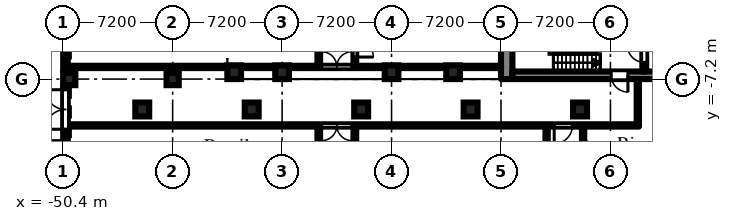
"""IFC4 building model, lengths in metres.
Left out: names, types, materials, properties, quantities, classifications, styles, units other than length and angle.
Written with IfcOpenShell. Run it as: python <this file> out.ifc"""

import sys

from ifc_helpers import new_model, si_unit, direction, frame, frame_2d, origin, origin_2d, place, context, subcontext, project, spatial, rectangle, hollow_circle, extrude, element, fill, save


model = new_model("IFC4")
c1 = context("Model", 3, precision=1e-05, world=origin(), true_north=direction((0.0, 1.0)))
c2 = subcontext(c1, "Body", "Model", "MODEL_VIEW")
j1 = project(units=[si_unit("LENGTHUNIT", "METRE"), si_unit("PLANEANGLEUNIT", "RADIAN")], contexts=[c1])
p1 = place(None, origin())
s1 = spatial("IfcSite", under=j1, at=p1, CompositionType="ELEMENT")
p2 = place(p1, origin())
s2 = spatial("IfcBuilding", under=s1, at=p2, CompositionType="ELEMENT")
p3 = place(p2, origin())
s3 = spatial("IfcBuildingStorey", under=s2, at=p3, CompositionType="ELEMENT", Elevation=0.0)
for number, where, z_axis, x_axis in (
    (1, (-39.15, -6.75, 0.0), (0.0, 0.0, 1.0), (1.0, 0.0, 0.0)),
    (2, (-36.0, -6.75, 0.0), (0.0, 0.0, 1.0), (1.0, 0.0, 0.0)),
    (3, (-28.8, -6.75, 0.0), (0.0, 0.0, 1.0), (1.0, 0.0, 0.0)),
    (4, (-24.75, -6.75, 0.0), (0.0, 0.0, 1.0), (1.0, 0.0, 0.0)),
):
    element("IfcColumn", number, at=place(p3, frame(where, z_axis=z_axis, x_axis=x_axis)), inside=s3, PredefinedType="COLUMN", context=c2, shape_type="SweptSolid", body=[
        extrude(rectangle(XDim=0.9, YDim=0.9, at=origin_2d()), origin(), (0.0, 0.0, 1.0), 7.2),
    ])
for number, where, z_axis, x_axis in (
    (5, (-50.0, -7.2, 0.0), (0.0, 0.0, 1.0), (1.0, 0.0, 0.0)),
    (6, (-43.2, -7.2, 0.0), (0.0, 0.0, 1.0), (1.0, 0.0, 0.0)),
):
    element("IfcColumn", number, at=place(p3, frame(where, z_axis=z_axis, x_axis=x_axis)), inside=s3, PredefinedType="COLUMN", context=c2, shape_type="SweptSolid", body=[
        extrude(rectangle(XDim=0.8, YDim=0.8, at=origin_2d()), origin(), (0.0, 0.0, 1.0), 6.6),
    ])
for number, where, z_axis, x_axis in (
    (7, (-45.2, -9.2, 0.0), (0.0, 0.0, 1.0), (1.0, 0.0, 0.0)),
    (8, (-38.0, -9.2, 0.0), (0.0, 0.0, 1.0), (1.0, 0.0, 0.0)),
    (9, (-30.8, -9.2, 0.0), (0.0, 0.0, 1.0), (1.0, 0.0, 0.0)),
    (10, (-23.6, -9.2, 0.0), (0.0, 0.0, 1.0), (1.0, 0.0, 0.0)),
    (11, (-16.4, -9.2, 0.0), (0.0, 0.0, 1.0), (1.0, 0.0, 0.0)),
):
    element("IfcColumn", number, at=place(p3, frame(where, z_axis=z_axis, x_axis=x_axis)), inside=s3, PredefinedType="COLUMN", context=c2, shape_type="SweptSolid", body=[
        extrude(hollow_circle(Radius=0.457, WallThickness=0.05, at=origin_2d()), origin(), (0.0, 0.0, 1.0), 7.5),
    ])
p4 = place(p3, frame((-50.25, -0.4, 0.0), z_axis=(0.0, 0.0, 1.0), x_axis=(0.0, -1.0, 0.0)))
e12 = element("IfcWall", 12, at=p4, inside=s3, PredefinedType="SOLIDWALL", context=c2, shape_type="SweptSolid", body=[
    extrude(rectangle(XDim=6.4, YDim=0.3, at=frame_2d((3.2, 0.0))), origin(), (0.0, 0.0, 1.0), 6.6),
])
p5 = place(p4, frame((1.65, 0.0, 0.0)))
e13 = element("IfcOpeningElement", 13, at=p5, cuts=e12, PredefinedType="OPENING", context=c2, shape_type="SweptSolid", body=[
    extrude(rectangle(XDim=1.3, YDim=2.1, at=frame_2d((0.65, 1.05))), frame((0.0, 0.16, 0.0), z_axis=(0.0, -1.0, 0.0), x_axis=(1.0, 0.0, 0.0)), (0.0, 0.0, 1.0), 0.32),
])
p6 = place(p3, frame((-50.25, -7.6, 0.0), z_axis=(0.0, 0.0, 1.0), x_axis=(0.0, -1.0, 0.0)))
e14 = element("IfcWall", 14, at=p6, inside=s3, PredefinedType="SOLIDWALL", context=c2, shape_type="SweptSolid", body=[
    extrude(rectangle(XDim=6.4, YDim=0.3, at=frame_2d((3.2, 0.0))), origin(), (0.0, 0.0, 1.0), 6.6),
])
p7 = place(p6, frame((0.3, 0.0, 0.0)))
e15 = element("IfcOpeningElement", 15, at=p7, cuts=e14, PredefinedType="OPENING", context=c2, shape_type="SweptSolid", body=[
    extrude(rectangle(XDim=2.6, YDim=2.4, at=frame_2d((1.3, 1.2))), frame((0.0, 0.16, 0.0), z_axis=(0.0, -1.0, 0.0), x_axis=(1.0, 0.0, 0.0)), (0.0, 0.0, 1.0), 0.32),
])
p8 = place(p6, frame((3.65, 0.0, 0.0)))
e16 = element("IfcOpeningElement", 16, at=p8, cuts=e14, PredefinedType="OPENING", context=c2, shape_type="SweptSolid", body=[
    extrude(rectangle(XDim=2.6, YDim=2.4, at=frame_2d((1.3, 1.2))), frame((0.0, 0.16, 0.0), z_axis=(0.0, -1.0, 0.0), x_axis=(1.0, 0.0, 0.0)), (0.0, 0.0, 1.0), 0.32),
])
p9 = place(p3, frame((-21.225, -7.2, 0.0), z_axis=(0.0, 0.0, 1.0), x_axis=(0.0, 1.0, 0.0)))
e17 = element("IfcWall", 17, at=p9, inside=s3, PredefinedType="SHEAR", context=c2, shape_type="SweptSolid", body=[
    extrude(rectangle(XDim=14.4, YDim=0.75, at=frame_2d((7.2, 0.0))), origin(), (0.0, 0.0, 1.0), 6.6),
])
p10 = place(p9, frame((6.0, 0.0, 0.0)))
e18 = element("IfcOpeningElement", 18, at=p10, cuts=e17, PredefinedType="OPENING", context=c2, shape_type="SweptSolid", body=[
    extrude(rectangle(XDim=2.4, YDim=2.2, at=frame_2d((1.2, 1.1))), frame((0.0, 0.385, 0.0), z_axis=(0.0, -1.0, 0.0), x_axis=(1.0, 0.0, 0.0)), (0.0, 0.0, 1.0), 0.77),
])
p11 = place(p3, frame((-7.9, -6.95, 0.0), z_axis=(0.0, 0.0, 1.0), x_axis=(-1.0, 0.0, 0.0)))
e19 = element("IfcWall", 19, at=p11, inside=s3, PredefinedType="SHEAR", context=c2, shape_type="SweptSolid", body=[
    extrude(rectangle(XDim=12.95, YDim=0.5, at=frame_2d((6.475, 0.0))), origin(), (0.0, 0.0, 1.0), 6.6),
])
p12 = place(p11, frame((5.35, 0.0, 0.0)))
e20 = element("IfcOpeningElement", 20, at=p12, cuts=e19, PredefinedType="OPENING", context=c2, shape_type="SweptSolid", body=[
    extrude(rectangle(XDim=1.1, YDim=2.1, at=frame_2d((0.55, 1.05))), frame((0.0, 0.26, 0.0), z_axis=(0.0, -1.0, 0.0), x_axis=(1.0, 0.0, 0.0)), (0.0, 0.0, 1.0), 0.52),
])
p13 = place(p3, frame((-12.175, -2.05, 0.0), z_axis=(0.0, 0.0, 1.0), x_axis=(0.0, -1.0, 0.0)))
e21 = element("IfcWall", 21, at=p13, inside=s3, PredefinedType="SHEAR", context=c2, shape_type="SweptSolid", body=[
    extrude(rectangle(XDim=4.65, YDim=0.25, at=frame_2d((2.325, 0.0))), origin(), (0.0, 0.0, 1.0), 6.6),
])
p14 = place(p13, frame((2.95, 0.0, 0.0)))
e22 = element("IfcOpeningElement", 22, at=p14, cuts=e21, PredefinedType="OPENING", context=c2, shape_type="SweptSolid", body=[
    extrude(rectangle(XDim=1.1, YDim=2.1, at=frame_2d((0.55, 1.05))), frame((0.0, 0.135, 0.0), z_axis=(0.0, -1.0, 0.0), x_axis=(1.0, 0.0, 0.0)), (0.0, 0.0, 1.0), 0.27),
])
p15 = place(p3, frame((-50.22, -10.25, 0.0), z_axis=(0.0, 0.0, 1.0), x_axis=(1.0, 0.0, 0.0)))
e23 = element("IfcWall", 23, at=p15, inside=s3, PredefinedType="PARTITIONING", context=c2, shape_type="SweptSolid", body=[
    extrude(rectangle(XDim=37.695, YDim=0.15, at=frame_2d((18.848, 0.0))), origin(), (0.0, 0.0, 1.0), 6.6),
])
p16 = place(p15, frame((16.82, 0.0, 0.0)))
e24 = element("IfcOpeningElement", 24, at=p16, cuts=e23, PredefinedType="OPENING", context=c2, shape_type="SweptSolid", body=[
    extrude(rectangle(XDim=2.0, YDim=2.1, at=frame_2d((1.0, 1.05))), frame((0.0, 0.085, 0.0), z_axis=(0.0, -1.0, 0.0), x_axis=(1.0, 0.0, 0.0)), (0.0, 0.0, 1.0), 0.17),
])
p17 = place(p15, frame((32.12, 0.0, 0.0)))
e25 = element("IfcOpeningElement", 25, at=p17, cuts=e23, PredefinedType="OPENING", context=c2, shape_type="SweptSolid", body=[
    extrude(rectangle(XDim=1.2, YDim=2.1, at=frame_2d((0.6, 1.05))), frame((0.0, 0.085, 0.0), z_axis=(0.0, -1.0, 0.0), x_axis=(1.0, 0.0, 0.0)), (0.0, 0.0, 1.0), 0.17),
])
p18 = place(p3, frame((-50.22, -6.4, 0.0), z_axis=(0.0, 0.0, 1.0), x_axis=(1.0, 0.0, 0.0)))
e26 = element("IfcWall", 26, at=p18, inside=s3, PredefinedType="PARTITIONING", context=c2, shape_type="SweptSolid", body=[
    extrude(rectangle(XDim=28.62, YDim=0.15, at=frame_2d((14.31, 0.0))), origin(), (0.0, 0.0, 1.0), 6.6),
])
p19 = place(p18, frame((16.82, 0.0, 0.0)))
e27 = element("IfcOpeningElement", 27, at=p19, cuts=e26, PredefinedType="OPENING", context=c2, shape_type="SweptSolid", body=[
    extrude(rectangle(XDim=2.0, YDim=2.1, at=frame_2d((1.0, 1.05))), frame((0.0, 0.085, 0.0), z_axis=(0.0, -1.0, 0.0), x_axis=(1.0, 0.0, 0.0)), (0.0, 0.0, 1.0), 0.17),
])
p20 = place(p3, frame((-33.6, -31.275, 0.0), z_axis=(0.0, 0.0, 1.0), x_axis=(0.0, 1.0, 0.0)))
e28 = element("IfcWall", 28, at=p20, inside=s3, PredefinedType="PARTITIONING", context=c2, shape_type="SweptSolid", body=[
    extrude(rectangle(XDim=20.95, YDim=0.15, at=frame_2d((10.475, 0.0))), origin(), (0.0, 0.0, 1.0), 6.6),
])
p21 = place(p20, frame((17.975, 0.0, 0.0)))
e29 = element("IfcOpeningElement", 29, at=p21, cuts=e28, PredefinedType="OPENING", context=c2, shape_type="SweptSolid", body=[
    extrude(rectangle(XDim=1.8, YDim=2.1, at=frame_2d((0.9, 1.05))), frame((0.0, 0.085, 0.0), z_axis=(0.0, -1.0, 0.0), x_axis=(1.0, 0.0, 0.0)), (0.0, 0.0, 1.0), 0.17),
])
p22 = place(p20, frame((0.725, 0.0, 0.0)))
e30 = element("IfcOpeningElement", 30, at=p22, cuts=e28, PredefinedType="OPENING", context=c2, shape_type="SweptSolid", body=[
    extrude(rectangle(XDim=1.8, YDim=2.1, at=frame_2d((0.9, 1.05))), frame((0.0, 0.085, 0.0), z_axis=(0.0, -1.0, 0.0), x_axis=(1.0, 0.0, 0.0)), (0.0, 0.0, 1.0), 0.17),
])
p23 = place(p20, frame((11.825, 0.0, 0.0)))
e31 = element("IfcOpeningElement", 31, at=p23, cuts=e28, PredefinedType="OPENING", context=c2, shape_type="SweptSolid", body=[
    extrude(rectangle(XDim=1.8, YDim=2.1, at=frame_2d((0.9, 1.05))), frame((0.0, 0.085, 0.0), z_axis=(0.0, -1.0, 0.0), x_axis=(1.0, 0.0, 0.0)), (0.0, 0.0, 1.0), 0.17),
])
p24 = place(p3, frame((-33.6, -6.325, 0.0), z_axis=(0.0, 0.0, 1.0), x_axis=(0.0, 1.0, 0.0)))
e32 = element("IfcWall", 32, at=p24, inside=s3, PredefinedType="PARTITIONING", context=c2, shape_type="SweptSolid", body=[
    extrude(rectangle(XDim=4.825, YDim=0.15, at=frame_2d((2.413, 0.0))), origin(), (0.0, 0.0, 1.0), 6.6),
])
p25 = place(p24, frame((2.375, 0.0, 0.0)))
e33 = element("IfcOpeningElement", 33, at=p25, cuts=e32, PredefinedType="OPENING", context=c2, shape_type="SweptSolid", body=[
    extrude(rectangle(XDim=1.8, YDim=2.1, at=frame_2d((0.9, 1.05))), frame((0.0, 0.085, 0.0), z_axis=(0.0, -1.0, 0.0), x_axis=(1.0, 0.0, 0.0)), (0.0, 0.0, 1.0), 0.17),
])
p26 = place(p3, frame((-31.2, -16.875, 0.0), z_axis=(0.0, 0.0, 1.0), x_axis=(0.0, 1.0, 0.0)))
e34 = element("IfcWall", 34, at=p26, inside=s3, PredefinedType="PARTITIONING", context=c2, shape_type="SweptSolid", body=[
    extrude(rectangle(XDim=6.55, YDim=0.15, at=frame_2d((3.275, 0.0))), origin(), (0.0, 0.0, 1.0), 6.6),
])
p27 = place(p26, frame((1.325, 0.0, 0.0)))
e35 = element("IfcOpeningElement", 35, at=p27, cuts=e34, PredefinedType="OPENING", context=c2, shape_type="SweptSolid", body=[
    extrude(rectangle(XDim=1.8, YDim=2.1, at=frame_2d((0.9, 1.05))), frame((0.0, 0.085, 0.0), z_axis=(0.0, -1.0, 0.0), x_axis=(1.0, 0.0, 0.0)), (0.0, 0.0, 1.0), 0.17),
])
p28 = place(p3, frame((-31.2, -6.325, 0.0), z_axis=(0.0, 0.0, 1.0), x_axis=(0.0, 1.0, 0.0)))
e36 = element("IfcWall", 36, at=p28, inside=s3, PredefinedType="PARTITIONING", context=c2, shape_type="SweptSolid", body=[
    extrude(rectangle(XDim=12.65, YDim=0.15, at=frame_2d((6.325, 0.0))), origin(), (0.0, 0.0, 1.0), 6.6),
])
p29 = place(p28, frame((5.325, 0.0, 0.0)))
e37 = element("IfcOpeningElement", 37, at=p29, cuts=e36, PredefinedType="OPENING", context=c2, shape_type="SweptSolid", body=[
    extrude(rectangle(XDim=2.0, YDim=2.1, at=frame_2d((1.0, 1.05))), frame((0.0, 0.085, 0.0), z_axis=(0.0, -1.0, 0.0), x_axis=(1.0, 0.0, 0.0)), (0.0, 0.0, 1.0), 0.17),
])
p30 = place(p28, frame((8.175, 0.0, 0.0)))
e38 = element("IfcOpeningElement", 38, at=p30, cuts=e36, PredefinedType="OPENING", context=c2, shape_type="SweptSolid", body=[
    extrude(rectangle(XDim=1.8, YDim=2.1, at=frame_2d((0.9, 1.05))), frame((0.0, 0.085, 0.0), z_axis=(0.0, -1.0, 0.0), x_axis=(1.0, 0.0, 0.0)), (0.0, 0.0, 1.0), 0.17),
])
p31 = place(p28, frame((0.575, 0.0, 0.0)))
e39 = element("IfcOpeningElement", 39, at=p31, cuts=e36, PredefinedType="OPENING", context=c2, shape_type="SweptSolid", body=[
    extrude(rectangle(XDim=1.2, YDim=2.1, at=frame_2d((0.6, 1.05))), frame((0.0, 0.085, 0.0), z_axis=(0.0, -1.0, 0.0), x_axis=(1.0, 0.0, 0.0)), (0.0, 0.0, 1.0), 0.17),
])
p32 = place(p3, frame((-18.6, -16.725, 0.0), z_axis=(0.0, 0.0, 1.0), x_axis=(0.0, 1.0, 0.0)))
e40 = element("IfcWall", 40, at=p32, inside=s3, PredefinedType="PARTITIONING", context=c2, shape_type="SweptSolid", body=[
    extrude(rectangle(XDim=6.4, YDim=0.15, at=frame_2d((3.2, 0.0))), origin(), (0.0, 0.0, 1.0), 6.6),
])
p33 = place(p32, frame((3.425, 0.0, 0.0)))
e41 = element("IfcOpeningElement", 41, at=p33, cuts=e40, PredefinedType="OPENING", context=c2, shape_type="SweptSolid", body=[
    extrude(rectangle(XDim=1.8, YDim=2.1, at=frame_2d((0.9, 1.05))), frame((0.0, 0.085, 0.0), z_axis=(0.0, -1.0, 0.0), x_axis=(1.0, 0.0, 0.0)), (0.0, 0.0, 1.0), 0.17),
])
p34 = place(p3, frame((-16.2, -16.875, 0.0), z_axis=(0.0, 0.0, 1.0), x_axis=(0.0, 1.0, 0.0)))
e42 = element("IfcWall", 42, at=p34, inside=s3, PredefinedType="PARTITIONING", context=c2, shape_type="SweptSolid", body=[
    extrude(rectangle(XDim=6.55, YDim=0.15, at=frame_2d((3.275, 0.0))), origin(), (0.0, 0.0, 1.0), 6.6),
])
p35 = place(p34, frame((1.911, 0.0, 0.0)))
e43 = element("IfcOpeningElement", 43, at=p35, cuts=e42, PredefinedType="OPENING", context=c2, shape_type="SweptSolid", body=[
    extrude(rectangle(XDim=1.2, YDim=2.1, at=frame_2d((0.6, 1.05))), frame((0.0, 0.085, 0.0), z_axis=(0.0, -1.0, 0.0), x_axis=(1.0, 0.0, 0.0)), (0.0, 0.0, 1.0), 0.17),
])
p36 = place(p34, frame((4.411, 0.0, 0.0)))
e44 = element("IfcOpeningElement", 44, at=p36, cuts=e42, PredefinedType="OPENING", context=c2, shape_type="SweptSolid", body=[
    extrude(rectangle(XDim=1.2, YDim=2.1, at=frame_2d((0.6, 1.05))), frame((0.0, 0.085, 0.0), z_axis=(0.0, -1.0, 0.0), x_axis=(1.0, 0.0, 0.0)), (0.0, 0.0, 1.0), 0.17),
])
p37 = place(p3, frame((-12.6, -10.175, 0.0), z_axis=(0.0, 0.0, 1.0), x_axis=(0.0, 1.0, 0.0)))
e45 = element("IfcWall", 45, at=p37, inside=s3, PredefinedType="PARTITIONING", context=c2, shape_type="SweptSolid", body=[
    extrude(rectangle(XDim=2.975, YDim=0.15, at=frame_2d((1.488, 0.0))), origin(), (0.0, 0.0, 1.0), 6.6),
])
p38 = place(p7, frame((2.6, 0.0, 0.0), z_axis=(0.0, 0.0, 1.0), x_axis=(-1.0, 0.0, 0.0)))
e46 = element("IfcDoor", 46, at=p38, inside=s3, OperationType="DOUBLE_DOOR_DOUBLE_SWING", PredefinedType="DOOR", context=c2, shape_type="SweptSolid", body=[
    extrude(rectangle(XDim=2.6, YDim=2.4, at=frame_2d((1.3, 1.2))), frame((0.0, 0.025, 0.0), z_axis=(0.0, -1.0, 0.0), x_axis=(1.0, 0.0, 0.0)), (0.0, 0.0, 1.0), 0.05),
])
fill(e15, e46)
p39 = place(p14, frame((1.1, 0.0, 0.0), z_axis=(0.0, 0.0, 1.0), x_axis=(-1.0, 0.0, 0.0)))
e47 = element("IfcDoor", 47, at=p39, inside=s3, OperationType="SINGLE_SWING_RIGHT", PredefinedType="DOOR", context=c2, shape_type="SweptSolid", body=[
    extrude(rectangle(XDim=1.1, YDim=2.1, at=frame_2d((0.55, 1.05))), frame((0.0, 0.025, 0.0), z_axis=(0.0, -1.0, 0.0), x_axis=(1.0, 0.0, 0.0)), (0.0, 0.0, 1.0), 0.05),
])
fill(e22, e47)
p40 = place(p12, origin())
e48 = element("IfcDoor", 48, at=p40, inside=s3, OperationType="SINGLE_SWING_LEFT", PredefinedType="DOOR", context=c2, shape_type="SweptSolid", body=[
    extrude(rectangle(XDim=1.1, YDim=2.1, at=frame_2d((0.55, 1.05))), frame((0.0, 0.025, 0.0), z_axis=(0.0, -1.0, 0.0), x_axis=(1.0, 0.0, 0.0)), (0.0, 0.0, 1.0), 0.05),
])
fill(e20, e48)
p41 = place(p16, frame((2.0, 0.0, 0.0), z_axis=(0.0, 0.0, 1.0), x_axis=(-1.0, 0.0, 0.0)))
e49 = element("IfcDoor", 49, at=p41, inside=s3, OperationType="DOUBLE_DOOR_DOUBLE_SWING", PredefinedType="DOOR", context=c2, shape_type="SweptSolid", body=[
    extrude(rectangle(XDim=2.0, YDim=2.1, at=frame_2d((1.0, 1.05))), frame((0.0, 0.025, 0.0), z_axis=(0.0, -1.0, 0.0), x_axis=(1.0, 0.0, 0.0)), (0.0, 0.0, 1.0), 0.05),
])
fill(e24, e49)
p42 = place(p19, origin())
e50 = element("IfcDoor", 50, at=p42, inside=s3, OperationType="DOUBLE_DOOR_DOUBLE_SWING", PredefinedType="DOOR", context=c2, shape_type="SweptSolid", body=[
    extrude(rectangle(XDim=2.0, YDim=2.1, at=frame_2d((1.0, 1.05))), frame((0.0, 0.025, 0.0), z_axis=(0.0, -1.0, 0.0), x_axis=(1.0, 0.0, 0.0)), (0.0, 0.0, 1.0), 0.05),
])
fill(e27, e50)
p43 = place(p17, frame((1.2, 0.0, 0.0), z_axis=(0.0, 0.0, 1.0), x_axis=(-1.0, 0.0, 0.0)))
e51 = element("IfcDoor", 51, at=p43, inside=s3, OperationType="SINGLE_SWING_RIGHT", PredefinedType="DOOR", context=c2, shape_type="SweptSolid", body=[
    extrude(rectangle(XDim=1.2, YDim=2.1, at=frame_2d((0.6, 1.05))), frame((0.0, 0.025, 0.0), z_axis=(0.0, -1.0, 0.0), x_axis=(1.0, 0.0, 0.0)), (0.0, 0.0, 1.0), 0.05),
])
fill(e25, e51)
p44 = place(p31, frame((1.2, 0.0, 0.0), z_axis=(0.0, 0.0, 1.0), x_axis=(-1.0, 0.0, 0.0)))
e52 = element("IfcDoor", 52, at=p44, inside=s3, OperationType="SINGLE_SWING_RIGHT", PredefinedType="DOOR", context=c2, shape_type="SweptSolid", body=[
    extrude(rectangle(XDim=1.2, YDim=2.1, at=frame_2d((0.6, 1.05))), frame((0.0, 0.025, 0.0), z_axis=(0.0, -1.0, 0.0), x_axis=(1.0, 0.0, 0.0)), (0.0, 0.0, 1.0), 0.05),
])
fill(e39, e52)
save(model, sys.argv[1])
